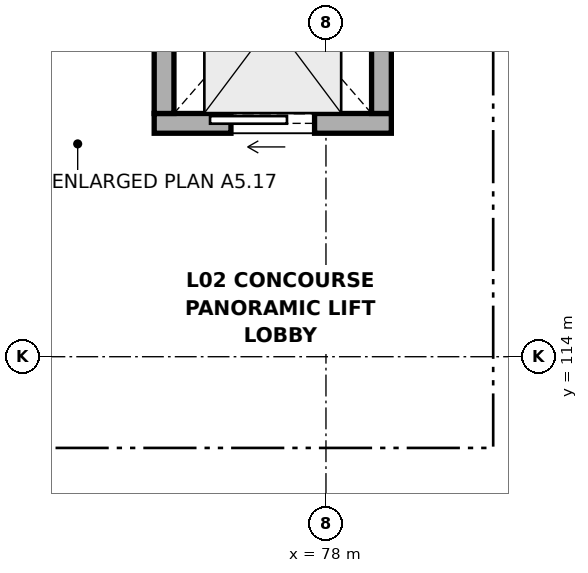
"""IFC4 building model, lengths in metres.
Left out: names, types, materials, properties, quantities, classifications, styles, units other than length and angle.
Written with IfcOpenShell. Run it as: python <this file> out.ifc"""

import sys

from ifc_helpers import new_model, si_unit, direction, frame, frame_2d, origin, place, context, subcontext, project, spatial, rectangle, extrude, element, fill, save


model = new_model("IFC4")
c1 = context("Model", 3, precision=1e-05, world=origin(), true_north=direction((0.0, 1.0)))
c2 = subcontext(c1, "Body", "Model", "MODEL_VIEW")
j1 = project(units=[si_unit("LENGTHUNIT", "METRE"), si_unit("PLANEANGLEUNIT", "RADIAN")], contexts=[c1])
p1 = place(None, origin())
s1 = spatial("IfcSite", under=j1, at=p1, CompositionType="ELEMENT")
p2 = place(p1, origin())
s2 = spatial("IfcBuilding", under=s1, at=p2, CompositionType="ELEMENT")
p3 = place(p2, frame((0.0, 0.0, 9.6)))
s3 = spatial("IfcBuildingStorey", under=s2, at=p3, CompositionType="ELEMENT", Elevation=9.6)
p4 = place(p3, frame((75.74, 117.07, 0.0), z_axis=(0.0, 0.0, 1.0), x_axis=(1.0, 0.0, 0.0)))
e1 = element("IfcWall", 1, at=p4, inside=s3, PredefinedType="SHEAR", context=c2, shape_type="SweptSolid", body=[
    extrude(rectangle(XDim=3.12, YDim=0.26, at=frame_2d((1.56, 0.0))), origin(), (0.0, 0.0, 1.0), 3.8),
])
p5 = place(p4, frame((1.01, 0.0, 0.0)))
e2 = element("IfcOpeningElement", 2, at=p5, cuts=e1, PredefinedType="OPENING", context=c2, shape_type="SweptSolid", body=[
    extrude(rectangle(XDim=1.1, YDim=2.15, at=frame_2d((0.55, 1.075))), frame((0.0, 0.14, 0.0), z_axis=(0.0, -1.0, 0.0), x_axis=(1.0, 0.0, 0.0)), (0.0, 0.0, 1.0), 0.28),
])
for number, where, z_axis, x_axis in (
    (3, (75.87, 117.2, 0.0), (0.0, 0.0, 1.0), (0.0, 1.0, 0.0)),
    (4, (78.73, 117.2, 0.0), (0.0, 0.0, 1.0), (0.0, 1.0, 0.0)),
):
    element("IfcWall", number, at=place(p3, frame(where, z_axis=z_axis, x_axis=x_axis)), inside=s3, PredefinedType="SHEAR", context=c2, shape_type="SweptSolid", body=[
        extrude(rectangle(XDim=3.0, YDim=0.26, at=frame_2d((1.5, 0.0))), origin(), (0.0, 0.0, 1.0), 3.8),
    ])
p6 = place(p5, origin())
e5 = element("IfcDoor", 5, at=p6, inside=s3, OperationType="SLIDING_TO_LEFT", PredefinedType="DOOR", context=c2, shape_type="SweptSolid", body=[
    extrude(rectangle(XDim=1.1, YDim=2.15, at=frame_2d((0.55, 1.075))), frame((0.0, 0.025, 0.0), z_axis=(0.0, -1.0, 0.0), x_axis=(1.0, 0.0, 0.0)), (0.0, 0.0, 1.0), 0.05),
])
fill(e2, e5)
save(model, sys.argv[1])
